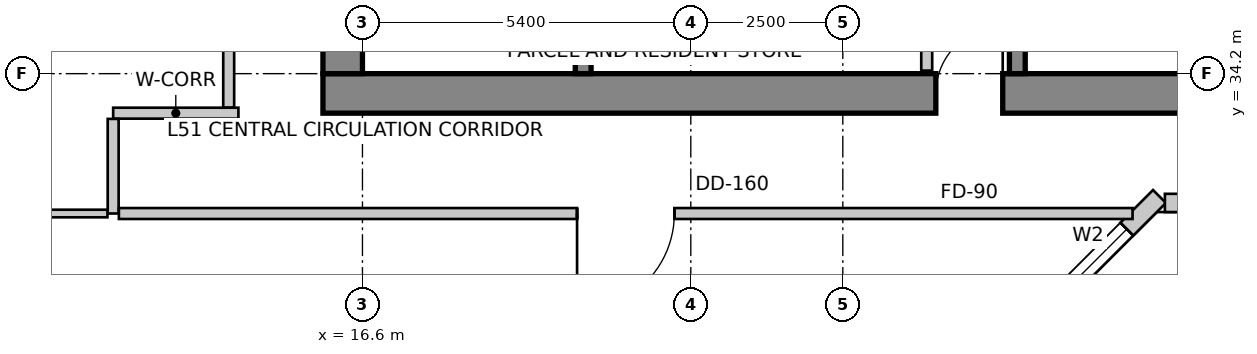
"""IFC4 building model, lengths in metres.
Left out: names, types, materials, properties, quantities, classifications, styles, units other than length and angle.
Written with IfcOpenShell. Run it as: python <this file> out.ifc"""

import sys

from ifc_helpers import new_model, si_unit, direction, frame, frame_2d, origin, place, context, subcontext, project, spatial, rectangle, extrude, source, transform, mapped, element, fill, save


model = new_model("IFC4")
c1 = context("Model", 3, precision=1e-05, world=origin(), true_north=direction((0.0, 1.0)))
c2 = subcontext(c1, "Body", "Model", "MODEL_VIEW")
j1 = project(units=[si_unit("LENGTHUNIT", "METRE"), si_unit("PLANEANGLEUNIT", "RADIAN")], contexts=[c1])
p1 = place(None, origin())
s1 = spatial("IfcSite", under=j1, at=p1, CompositionType="ELEMENT")
p2 = place(p1, origin())
s2 = spatial("IfcBuilding", under=s1, at=p2, CompositionType="ELEMENT")
p3 = place(p2, frame((0.0, 0.0, 204.4)))
s3 = spatial("IfcBuildingStorey", under=s2, at=p3, CompositionType="ELEMENT", Elevation=204.4)
p4 = place(p3, frame((15.95, 33.875, 0.0), z_axis=(0.0, 0.0, 1.0), x_axis=(1.0, 0.0, 0.0)))
e1 = element("IfcWall", 1, at=p4, inside=s3, PredefinedType="SHEAR", context=c2, shape_type="SweptSolid", body=[
    extrude(rectangle(XDim=15.7, YDim=0.65, at=frame_2d((7.85, 0.0))), origin(), (0.0, 0.0, 1.0), 3.5),
])
m1 = source(origin(), c2, "Body", "SweptSolid", [
    extrude(rectangle(XDim=1.1, YDim=2.15, at=frame_2d((0.55, 1.075))), frame((0.0, 0.335, 0.0), z_axis=(0.0, -1.0, 0.0), x_axis=(1.0, 0.0, 0.0)), (0.0, 0.0, 1.0), 0.67),
])
p5 = place(p4, frame((10.08, 0.0, 0.0)))
e2 = element("IfcOpeningElement", 2, at=p5, cuts=e1, PredefinedType="OPENING", context=c2, shape_type="MappedRepresentation", body=[
    mapped(m1, transform((0.0, 0.0, 0.0), scale=1.0)),
])
p6 = place(p3, frame((16.275, 34.2, 0.0), z_axis=(0.0, 0.0, 1.0), x_axis=(0.0, 1.0, 0.0)))
e3 = element("IfcWall", 3, at=p6, inside=s3, PredefinedType="SHEAR", context=c2, shape_type="SweptSolid", body=[
    extrude(rectangle(XDim=11.4, YDim=0.65, at=frame_2d((5.7, 0.0))), origin(), (0.0, 0.0, 1.0), 3.5),
])
p7 = place(p6, frame((7.15, 0.0, 0.0)))
e4 = element("IfcOpeningElement", 4, at=p7, cuts=e3, PredefinedType="OPENING", context=c2, shape_type="MappedRepresentation", body=[
    mapped(m1, transform((0.0, 0.0, 0.0), scale=1.0)),
])
p8 = place(p3, frame((20.23, 34.2, 0.0), z_axis=(0.0, 0.0, 1.0), x_axis=(0.0, 1.0, 0.0)))
e5 = element("IfcWall", 5, at=p8, inside=s3, PredefinedType="SHEAR", context=c2, shape_type="SweptSolid", body=[
    extrude(rectangle(XDim=9.06, YDim=0.26, at=frame_2d((4.53, 0.0))), origin(), (0.0, 0.0, 1.0), 3.5),
])
m2 = source(origin(), c2, "Body", "SweptSolid", [
    extrude(rectangle(XDim=1.1, YDim=2.15, at=frame_2d((0.55, 1.075))), frame((0.0, 0.14, 0.0), z_axis=(0.0, -1.0, 0.0), x_axis=(1.0, 0.0, 0.0)), (0.0, 0.0, 1.0), 0.28),
])
p9 = place(p8, frame((7.45, 0.0, 0.0)))
e6 = element("IfcOpeningElement", 6, at=p9, cuts=e5, PredefinedType="OPENING", context=c2, shape_type="MappedRepresentation", body=[
    mapped(m2, transform((0.0, 0.0, 0.0), scale=1.0)),
])
p10 = place(p3, frame((27.37, 34.2, 0.0), z_axis=(0.0, 0.0, 1.0), x_axis=(0.0, 1.0, 0.0)))
e7 = element("IfcWall", 7, at=p10, inside=s3, PredefinedType="SHEAR", context=c2, shape_type="SweptSolid", body=[
    extrude(rectangle(XDim=9.06, YDim=0.26, at=frame_2d((4.53, 0.0))), origin(), (0.0, 0.0, 1.0), 3.5),
])
p11 = place(p10, frame((7.45, 0.0, 0.0)))
e8 = element("IfcOpeningElement", 8, at=p11, cuts=e7, PredefinedType="OPENING", context=c2, shape_type="MappedRepresentation", body=[
    mapped(m2, transform((0.0, 0.0, 0.0), scale=1.0)),
])
p12 = place(p3, frame((27.652, 30.124, 0.0), z_axis=(0.0, 0.0, 1.0), x_axis=(0.707064797706, 0.707148762175, 0.0)))
e9 = element("IfcWall", 9, at=p12, inside=s3, PredefinedType="SOLIDWALL", context=c2, shape_type="SweptSolid", body=[
    extrude(rectangle(XDim=2.908, YDim=0.3, at=frame_2d((1.454, 0.0))), origin(), (0.0, 0.0, 1.0), 3.25),
])
m3 = source(origin(), c2, "Body", "SweptSolid", [
    extrude(rectangle(XDim=1.8, YDim=2.1, at=frame_2d((0.9, 1.05))), frame((0.0, 0.16, 0.0), z_axis=(0.0, -1.0, 0.0), x_axis=(1.0, 0.0, 0.0)), (0.0, 0.0, 1.0), 0.32),
])
p13 = place(p12, frame((0.348, 0.0, 0.85)))
e10 = element("IfcOpeningElement", 10, at=p13, cuts=e9, PredefinedType="OPENING", context=c2, shape_type="MappedRepresentation", body=[
    mapped(m3, transform((0.0, 0.0, 0.0), scale=1.0)),
])
p14 = place(p3, frame((29.797, 32.074, 0.0), z_axis=(0.0, 0.0, 1.0), x_axis=(1.0, 0.0, 0.0)))
e11 = element("IfcWall", 11, at=p14, inside=s3, PredefinedType="SOLIDWALL", context=c2, shape_type="SweptSolid", body=[
    extrude(rectangle(XDim=0.882, YDim=0.3, at=frame_2d((0.441, 0.0))), origin(), (0.0, 0.0, 1.0), 3.25),
])
p15 = place(p3, frame((13.269, 47.134, 0.0), z_axis=(0.0, 0.0, 1.0), x_axis=(-0.319920776449, -0.947444297464, 0.0)))
e12 = element("IfcWall", 12, at=p15, inside=s3, PredefinedType="SOLIDWALL", context=c2, shape_type="SweptSolid", body=[
    extrude(rectangle(XDim=16.133, YDim=0.3, at=frame_2d((8.067, 0.0))), origin(), (0.0, 0.0, 1.0), 3.25),
])
m4 = source(origin(), c2, "Body", "SweptSolid", [
    extrude(rectangle(XDim=2.1, YDim=2.0, at=frame_2d((1.05, 1.0))), frame((0.0, 0.16, 0.0), z_axis=(0.0, -1.0, 0.0), x_axis=(1.0, 0.0, 0.0)), (0.0, 0.0, 1.0), 0.32),
])
p16 = place(p15, frame((2.513, 0.0, 0.85)))
e13 = element("IfcOpeningElement", 13, at=p16, cuts=e12, PredefinedType="OPENING", context=c2, shape_type="MappedRepresentation", body=[
    mapped(m4, transform((0.0, 0.0, 0.0), scale=1.0)),
])
m5 = source(origin(), c2, "Body", "SweptSolid", [
    extrude(rectangle(XDim=2.4, YDim=2.2, at=frame_2d((1.2, 1.1))), frame((0.0, 0.16, 0.0), z_axis=(0.0, -1.0, 0.0), x_axis=(1.0, 0.0, 0.0)), (0.0, 0.0, 1.0), 0.32),
])
p17 = place(p15, frame((7.26, 0.0, 0.85)))
e14 = element("IfcOpeningElement", 14, at=p17, cuts=e12, PredefinedType="OPENING", context=c2, shape_type="MappedRepresentation", body=[
    mapped(m5, transform((0.0, 0.0, 0.0), scale=1.0)),
])
p18 = place(p15, frame((12.307, 0.0, 0.85)))
e15 = element("IfcOpeningElement", 15, at=p18, cuts=e12, PredefinedType="OPENING", context=c2, shape_type="MappedRepresentation", body=[
    mapped(m4, transform((0.0, 0.0, 0.0), scale=1.0)),
])
p19 = place(p3, frame((8.188, 31.834, 0.0), z_axis=(0.0, 0.0, 1.0), x_axis=(0.202303475707, -0.979322880217, 0.0)))
e16 = element("IfcWall", 16, at=p19, inside=s3, PredefinedType="SOLIDWALL", context=c2, shape_type="SweptSolid", body=[
    extrude(rectangle(XDim=15.766, YDim=0.3, at=frame_2d((7.883, 0.0))), origin(), (0.0, 0.0, 1.0), 3.25),
])
m6 = source(origin(), c2, "Body", "SweptSolid", [
    extrude(rectangle(XDim=1.6, YDim=2.15, at=frame_2d((0.8, 1.075))), frame((0.0, 0.16, 0.0), z_axis=(0.0, -1.0, 0.0), x_axis=(1.0, 0.0, 0.0)), (0.0, 0.0, 1.0), 0.32),
])
p20 = place(p19, frame((9.466, 0.0, 0.0)))
e17 = element("IfcOpeningElement", 17, at=p20, cuts=e16, PredefinedType="OPENING", context=c2, shape_type="MappedRepresentation", body=[
    mapped(m6, transform((0.0, 0.0, 0.0), scale=1.0)),
])
p21 = place(p19, frame((1.337, 0.0, 0.85)))
e18 = element("IfcOpeningElement", 18, at=p21, cuts=e16, PredefinedType="OPENING", context=c2, shape_type="MappedRepresentation", body=[
    mapped(m5, transform((0.0, 0.0, 0.0), scale=1.0)),
])
p22 = place(p19, frame((5.92, 0.0, 0.85)))
e19 = element("IfcOpeningElement", 19, at=p22, cuts=e16, PredefinedType="OPENING", context=c2, shape_type="MappedRepresentation", body=[
    mapped(m4, transform((0.0, 0.0, 0.0), scale=1.0)),
])
p23 = place(p19, frame((11.438, 0.0, 0.85)))
e20 = element("IfcOpeningElement", 20, at=p23, cuts=e16, PredefinedType="OPENING", context=c2, shape_type="MappedRepresentation", body=[
    mapped(m5, transform((0.0, 0.0, 0.0), scale=1.0)),
])
p24 = place(p3, frame((25.88, 35.956, 0.0), z_axis=(0.0, 0.0, 1.0), x_axis=(0.0, -1.0, 0.0)))
e21 = element("IfcWall", 21, at=p24, inside=s3, PredefinedType="PARTITIONING", context=c2, shape_type="SweptSolid", body=[
    extrude(rectangle(XDim=1.706, YDim=0.18, at=frame_2d((0.853, 0.0))), origin(), (0.0, 0.0, 1.0), 2.542),
])
p25 = place(p3, frame((12.5, 33.55, 0.0), z_axis=(0.0, 0.0, 1.0), x_axis=(1.0, 0.0, 0.0)))
e22 = element("IfcWall", 22, at=p25, inside=s3, PredefinedType="PARTITIONING", context=c2, shape_type="SweptSolid", body=[
    extrude(rectangle(XDim=2.06, YDim=0.18, at=frame_2d((1.03, 0.0))), origin(), (0.0, 0.0, 1.0), 3.25),
])
p26 = place(p3, frame((12.5, 31.9, 0.0), z_axis=(0.0, 0.0, 1.0), x_axis=(0.0, 1.0, 0.0)))
e23 = element("IfcWall", 23, at=p26, inside=s3, PredefinedType="PARTITIONING", context=c2, shape_type="SweptSolid", body=[
    extrude(rectangle(XDim=1.556, YDim=0.18, at=frame_2d((0.778, 0.0))), origin(), (0.0, 0.0, 1.0), 2.835),
])
p27 = place(p3, frame((29.265, 31.9, 0.0), z_axis=(0.0, 0.0, 1.0), x_axis=(-1.0, 0.0, 0.0)))
e24 = element("IfcWall", 24, at=p27, inside=s3, PredefinedType="PARTITIONING", context=c2, shape_type="SweptSolid", body=[
    extrude(rectangle(XDim=16.671, YDim=0.18, at=frame_2d((8.335, 0.0))), origin(), (0.0, 0.0, 1.0), 2.835),
])
m7 = source(origin(), c2, "Body", "SweptSolid", [
    extrude(rectangle(XDim=1.6, YDim=2.15, at=frame_2d((0.8, 1.075))), frame((0.0, 0.1, 0.0), z_axis=(0.0, -1.0, 0.0), x_axis=(1.0, 0.0, 0.0)), (0.0, 0.0, 1.0), 0.2),
])
p28 = place(p27, frame((7.536, 0.0, 0.0)))
e25 = element("IfcOpeningElement", 25, at=p28, cuts=e24, PredefinedType="OPENING", context=c2, shape_type="MappedRepresentation", body=[
    mapped(m7, transform((0.0, 0.0, 0.0), scale=1.0)),
])
p29 = place(p3, frame((14.4, 33.644, 0.0), z_axis=(0.0, 0.0, 1.0), x_axis=(0.0, 1.0, 0.0)))
e26 = element("IfcWall", 26, at=p29, inside=s3, PredefinedType="PARTITIONING", context=c2, shape_type="SweptSolid", body=[
    extrude(rectangle(XDim=12.606, YDim=0.18, at=frame_2d((6.303, 0.0))), origin(), (0.0, 0.0, 1.0), 3.25),
])
m8 = source(origin(), c2, "Body", "SweptSolid", [
    extrude(rectangle(XDim=0.9, YDim=2.15, at=frame_2d((0.45, 1.075))), frame((0.0, 0.1, 0.0), z_axis=(0.0, -1.0, 0.0), x_axis=(1.0, 0.0, 0.0)), (0.0, 0.0, 1.0), 0.2),
])
p30 = place(p29, frame((4.399, 0.0, 0.0)))
e27 = element("IfcOpeningElement", 27, at=p30, cuts=e26, PredefinedType="OPENING", context=c2, shape_type="MappedRepresentation", body=[
    mapped(m8, transform((0.0, 0.0, 0.0), scale=1.0)),
])
p31 = place(p3, frame((12.406, 31.9, 0.0), z_axis=(0.0, 0.0, 1.0), x_axis=(-1.0, 0.0, 0.0)))
e28 = element("IfcWall", 28, at=p31, inside=s3, PredefinedType="PARTITIONING", context=c2, shape_type="SweptSolid", body=[
    extrude(rectangle(XDim=4.115, YDim=0.125, at=frame_2d((2.057, 0.0))), origin(), (0.0, 0.0, 1.0), 2.542),
])
m9 = source(origin(), c2, "Body", "SweptSolid", [
    extrude(rectangle(XDim=1.8, YDim=2.1, at=frame_2d((0.9, 1.05))), frame((0.0, -0.015, 0.0), z_axis=(0.0, -1.0, 0.0), x_axis=(1.0, 0.0, 0.0)), (0.0, 0.0, 1.0), 0.06),
])
p32 = place(p13, origin())
e29 = element("IfcWindow", 29, at=p32, inside=s3, PartitioningType="SINGLE_PANEL", PredefinedType="WINDOW", context=c2, shape_type="MappedRepresentation", body=[
    mapped(m9, transform((0.0, 0.0, 0.0), scale=1.0)),
])
fill(e10, e29)
m10 = source(origin(), c2, "Body", "SweptSolid", [
    extrude(rectangle(XDim=1.1, YDim=2.15, at=frame_2d((0.55, 1.075))), frame((0.0, 0.025, 0.0), z_axis=(0.0, -1.0, 0.0), x_axis=(1.0, 0.0, 0.0)), (0.0, 0.0, 1.0), 0.05),
])
p33 = place(p5, origin())
e30 = element("IfcDoor", 30, at=p33, inside=s3, OperationType="SINGLE_SWING_RIGHT", PredefinedType="DOOR", context=c2, shape_type="MappedRepresentation", body=[
    mapped(m10, transform((0.0, 0.0, 0.0), scale=1.0)),
])
fill(e2, e30)
m11 = source(origin(), c2, "Body", "SweptSolid", [
    extrude(rectangle(XDim=1.6, YDim=2.15, at=frame_2d((0.8, 1.075))), frame((0.0, 0.025, 0.0), z_axis=(0.0, -1.0, 0.0), x_axis=(1.0, 0.0, 0.0)), (0.0, 0.0, 1.0), 0.05),
])
p34 = place(p28, origin())
e31 = element("IfcDoor", 31, at=p34, inside=s3, OperationType="SINGLE_SWING_RIGHT", PredefinedType="DOOR", context=c2, shape_type="MappedRepresentation", body=[
    mapped(m11, transform((0.0, 0.0, 0.0), scale=1.0)),
])
fill(e25, e31)
save(model, sys.argv[1])
